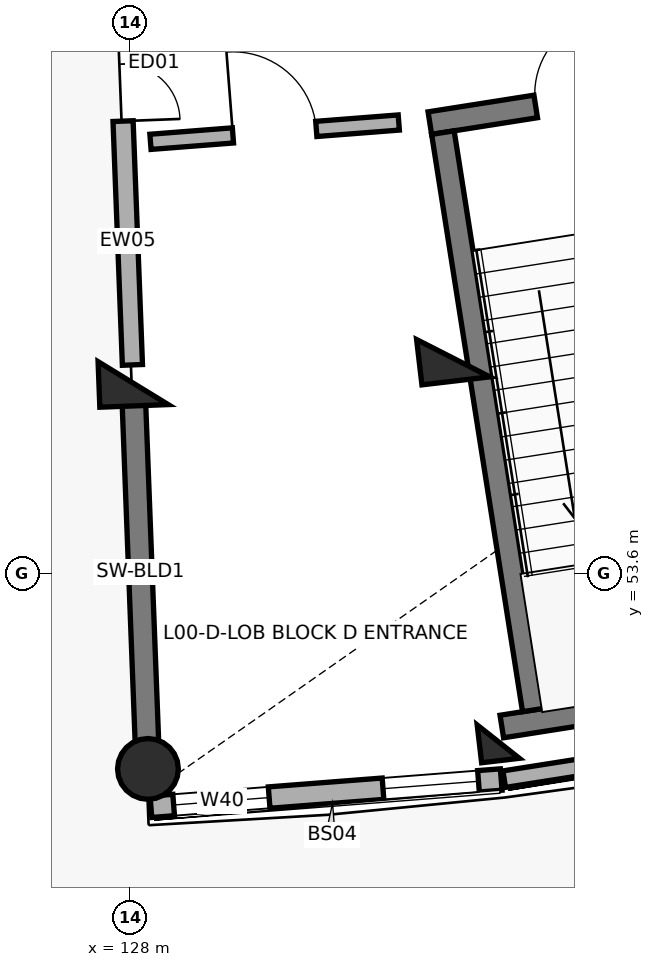
"""IFC4 building model, lengths in metres.
Left out: names, types, materials, properties, quantities, classifications, styles, units other than length and angle.
Written with IfcOpenShell. Run it as: python <this file> out.ifc"""

import sys

from ifc_helpers import new_model, si_unit, direction, frame, frame_2d, origin, origin_2d, place, context, subcontext, project, spatial, rectangle, circle, extrude, element, fill, save


model = new_model("IFC4")
c1 = context("Model", 3, precision=1e-05, world=origin(), true_north=direction((0.0, 1.0)))
c2 = subcontext(c1, "Body", "Model", "MODEL_VIEW")
j1 = project(units=[si_unit("LENGTHUNIT", "METRE"), si_unit("PLANEANGLEUNIT", "RADIAN")], contexts=[c1])
p1 = place(None, origin())
s1 = spatial("IfcSite", under=j1, at=p1, CompositionType="ELEMENT")
p2 = place(p1, origin())
s2 = spatial("IfcBuilding", under=s1, at=p2, CompositionType="ELEMENT")
p3 = place(p2, origin())
s3 = spatial("IfcBuildingStorey", under=s2, at=p3, CompositionType="ELEMENT", Elevation=0.0)
p4 = place(p3, frame((128.045, 56.1, 0.0), z_axis=(0.0, 0.0, 1.0), x_axis=(0.038387809088, -0.999262916411, 0.0)))
e1 = element("IfcColumn", 1, at=p4, inside=s3, PredefinedType="COLUMN", context=c2, shape_type="SweptSolid", body=[
    extrude(rectangle(XDim=0.6, YDim=0.9, at=origin_2d()), origin(), (0.0, 0.0, 1.0), 4.5),
])
p5 = place(p3, frame((128.24, 51.023, 0.0), z_axis=(0.0, 0.0, 1.0), x_axis=(0.038387809088, -0.999262916411, 0.0)))
e2 = element("IfcColumn", 2, at=p5, inside=s3, PredefinedType="COLUMN", context=c2, shape_type="SweptSolid", body=[
    extrude(circle(Radius=0.4, at=origin_2d()), origin(), (0.0, 0.0, 1.0), 4.5),
])
p6 = place(p3, frame((132.257, 56.427, 0.0), z_axis=(0.0, 0.0, 1.0), x_axis=(0.116670737099, -0.993170649538, 0.0)))
e3 = element("IfcColumn", 3, at=p6, inside=s3, PredefinedType="COLUMN", context=c2, shape_type="SweptSolid", body=[
    extrude(rectangle(XDim=0.6, YDim=0.9, at=origin_2d()), origin(), (0.0, 0.0, 1.0), 4.5),
])
p7 = place(p3, frame((132.85, 51.382, 0.0), z_axis=(0.0, 0.0, 1.0), x_axis=(0.116670737099, -0.993170649538, 0.0)))
e4 = element("IfcColumn", 4, at=p7, inside=s3, PredefinedType="COLUMN", context=c2, shape_type="SweptSolid", body=[
    extrude(rectangle(XDim=0.5, YDim=0.5, at=origin_2d()), origin(), (0.0, 0.0, 1.0), 4.5),
])
p8 = place(p3, frame((128.052, 55.92, 0.0), z_axis=(0.0, 0.0, 1.0), x_axis=(0.038381471406, -0.99926315986, 0.0)))
e5 = element("IfcWall", 5, at=p8, inside=s3, PredefinedType="SHEAR", context=c2, shape_type="SweptSolid", body=[
    extrude(rectangle(XDim=4.72, YDim=0.31, at=frame_2d((2.36, 0.0))), origin(), (0.0, 0.0, 1.0), 4.26),
])
p9 = place(p3, frame((128.279, 50.525, 0.0), z_axis=(0.0, 0.0, 1.0), x_axis=(0.996985740974, 0.07758500045, 0.0)))
e6 = element("IfcWall", 6, at=p9, inside=s3, PredefinedType="SOLIDWALL", context=c2, shape_type="SweptSolid", body=[
    extrude(rectangle(XDim=4.623, YDim=0.282, at=frame_2d((2.311, 0.0))), origin(), (0.0, 0.0, 1.0), 3.45),
])
p10 = place(p9, frame((0.3, 0.0, 0.3)))
e7 = element("IfcOpeningElement", 7, at=p10, cuts=e6, PredefinedType="OPENING", context=c2, shape_type="SweptSolid", body=[
    extrude(rectangle(XDim=1.26, YDim=1.56, at=frame_2d((0.63, 0.78))), frame((0.0, 0.151, 0.0), z_axis=(0.0, -1.0, 0.0), x_axis=(1.0, 0.0, 0.0)), (0.0, 0.0, 1.0), 0.302),
])
p11 = place(p9, frame((3.062, 0.0, 0.3)))
e8 = element("IfcOpeningElement", 8, at=p11, cuts=e6, PredefinedType="OPENING", context=c2, shape_type="SweptSolid", body=[
    extrude(rectangle(XDim=1.26, YDim=1.56, at=frame_2d((0.63, 0.78))), frame((0.0, 0.151, 0.0), z_axis=(0.0, -1.0, 0.0), x_axis=(1.0, 0.0, 0.0)), (0.0, 0.0, 1.0), 0.302),
])
p12 = place(p3, frame((132.928, 50.889, 0.0), z_axis=(0.0, 0.0, 1.0), x_axis=(0.987828826394, 0.155544880165, 0.0)))
e9 = element("IfcWall", 9, at=p12, inside=s3, PredefinedType="SOLIDWALL", context=c2, shape_type="SweptSolid", body=[
    extrude(rectangle(XDim=4.622, YDim=0.22, at=frame_2d((2.311, 0.0))), origin(), (0.0, 0.0, 1.0), 3.45),
])
p13 = place(p3, frame((127.721, 64.533, 0.0), z_axis=(0.0, 0.0, 1.0), x_axis=(0.038407966241, -0.999262141847, 0.0)))
e10 = element("IfcWall", 10, at=p13, inside=s3, PredefinedType="SOLIDWALL", context=c2, shape_type="SweptSolid", body=[
    extrude(rectangle(XDim=8.2, YDim=0.265, at=frame_2d((4.1, 0.0))), origin(), (0.0, 0.0, 1.0), 3.34),
])
p14 = place(p13, frame((3.49, 0.0, 0.0)))
e11 = element("IfcOpeningElement", 11, at=p14, cuts=e10, PredefinedType="OPENING", context=c2, shape_type="SweptSolid", body=[
    extrude(rectangle(XDim=1.5, YDim=2.2, at=frame_2d((0.75, 1.1))), frame((0.0, 0.142, 0.0), z_axis=(0.0, -1.0, 0.0), x_axis=(1.0, 0.0, 0.0)), (0.0, 0.0, 1.0), 0.285),
])
p15 = place(p3, frame((131.949, 59.521, 0.0), z_axis=(0.0, 0.0, 1.0), x_axis=(0.98782579805, 0.155564111245, 0.0)))
e12 = element("IfcWall", 12, at=p15, inside=s3, PredefinedType="SHEAR", context=c2, shape_type="SweptSolid", body=[
    extrude(rectangle(XDim=3.87, YDim=0.3, at=frame_2d((1.935, 0.0))), origin(), (0.0, 0.0, 1.0), 4.5),
])
p16 = place(p15, frame((1.41, 0.0, 0.0)))
e13 = element("IfcOpeningElement", 13, at=p16, cuts=e12, PredefinedType="OPENING", context=c2, shape_type="SweptSolid", body=[
    extrude(rectangle(XDim=1.05, YDim=2.15, at=frame_2d((0.525, 1.075))), frame((0.0, 0.16, 0.0), z_axis=(0.0, -1.0, 0.0), x_axis=(1.0, 0.0, 0.0)), (0.0, 0.0, 1.0), 0.32),
])
p17 = place(p3, frame((132.896, 51.581, 0.0), z_axis=(0.0, 0.0, 1.0), x_axis=(0.987819142769, 0.155606366126, 0.0)))
e14 = element("IfcWall", 14, at=p17, inside=s3, PredefinedType="SHEAR", context=c2, shape_type="SweptSolid", body=[
    extrude(rectangle(XDim=4.47, YDim=0.3, at=frame_2d((2.235, 0.0))), origin(), (0.0, 0.0, 1.0), 4.5),
])
p18 = place(p3, frame((132.121, 59.396, 0.0), z_axis=(0.0, 0.0, 1.0), x_axis=(0.155563141844, -0.987825950712, 0.0)))
e15 = element("IfcWall", 15, at=p18, inside=s3, PredefinedType="SHEAR", context=c2, shape_type="SweptSolid", body=[
    extrude(rectangle(XDim=7.69, YDim=0.3, at=frame_2d((3.845, 0.0))), origin(), (0.0, 0.0, 1.0), 4.5),
])
p19 = place(p3, frame((128.273, 59.274, 0.0), z_axis=(0.0, 0.0, 1.0), x_axis=(0.996982624396, 0.077625038827, 0.0)))
e16 = element("IfcWall", 16, at=p19, inside=s3, PredefinedType="SOLIDWALL", context=c2, shape_type="SweptSolid", body=[
    extrude(rectangle(XDim=3.277, YDim=0.2, at=frame_2d((1.639, 0.0))), origin(), (0.0, 0.0, 1.0), 3.34),
])
p20 = place(p19, frame((1.088, 0.0, 0.0)))
e17 = element("IfcOpeningElement", 17, at=p20, cuts=e16, PredefinedType="OPENING", context=c2, shape_type="SweptSolid", body=[
    extrude(rectangle(XDim=1.1, YDim=2.15, at=frame_2d((0.55, 1.075))), frame((0.0, 0.11, 0.0), z_axis=(0.0, -1.0, 0.0), x_axis=(1.0, 0.0, 0.0)), (0.0, 0.0, 1.0), 0.22),
])
p21 = place(p10, origin())
e18 = element("IfcWindow", 18, at=p21, inside=s3, PartitioningType="DOUBLE_PANEL_VERTICAL", PredefinedType="WINDOW", context=c2, shape_type="SweptSolid", body=[
    extrude(rectangle(XDim=1.26, YDim=1.56, at=frame_2d((0.63, 0.78))), frame((0.0, 0.03, 0.0), z_axis=(0.0, -1.0, 0.0), x_axis=(1.0, 0.0, 0.0)), (0.0, 0.0, 1.0), 0.06),
])
fill(e7, e18)
p22 = place(p11, origin())
e19 = element("IfcWindow", 19, at=p22, inside=s3, PartitioningType="DOUBLE_PANEL_VERTICAL", PredefinedType="WINDOW", context=c2, shape_type="SweptSolid", body=[
    extrude(rectangle(XDim=1.26, YDim=1.56, at=frame_2d((0.63, 0.78))), frame((0.0, 0.03, 0.0), z_axis=(0.0, -1.0, 0.0), x_axis=(1.0, 0.0, 0.0)), (0.0, 0.0, 1.0), 0.06),
])
fill(e8, e19)
p23 = place(p14, origin())
e20 = element("IfcDoor", 20, at=p23, inside=s3, OperationType="DOUBLE_DOOR_SINGLE_SWING", PredefinedType="DOOR", context=c2, shape_type="SweptSolid", body=[
    extrude(rectangle(XDim=1.5, YDim=2.2, at=frame_2d((0.75, 1.1))), frame((0.0, 0.025, 0.0), z_axis=(0.0, -1.0, 0.0), x_axis=(1.0, 0.0, 0.0)), (0.0, 0.0, 1.0), 0.05),
])
fill(e11, e20)
p24 = place(p16, origin())
e21 = element("IfcDoor", 21, at=p24, inside=s3, OperationType="SINGLE_SWING_RIGHT", PredefinedType="DOOR", context=c2, shape_type="SweptSolid", body=[
    extrude(rectangle(XDim=1.05, YDim=2.15, at=frame_2d((0.525, 1.075))), frame((0.0, 0.025, 0.0), z_axis=(0.0, -1.0, 0.0), x_axis=(1.0, 0.0, 0.0)), (0.0, 0.0, 1.0), 0.05),
])
fill(e13, e21)
p25 = place(p20, origin())
e22 = element("IfcDoor", 22, at=p25, inside=s3, OperationType="SINGLE_SWING_LEFT", PredefinedType="DOOR", context=c2, shape_type="SweptSolid", body=[
    extrude(rectangle(XDim=1.1, YDim=2.15, at=frame_2d((0.55, 1.075))), frame((0.0, 0.025, 0.0), z_axis=(0.0, -1.0, 0.0), x_axis=(1.0, 0.0, 0.0)), (0.0, 0.0, 1.0), 0.05),
])
fill(e17, e22)
save(model, sys.argv[1])
